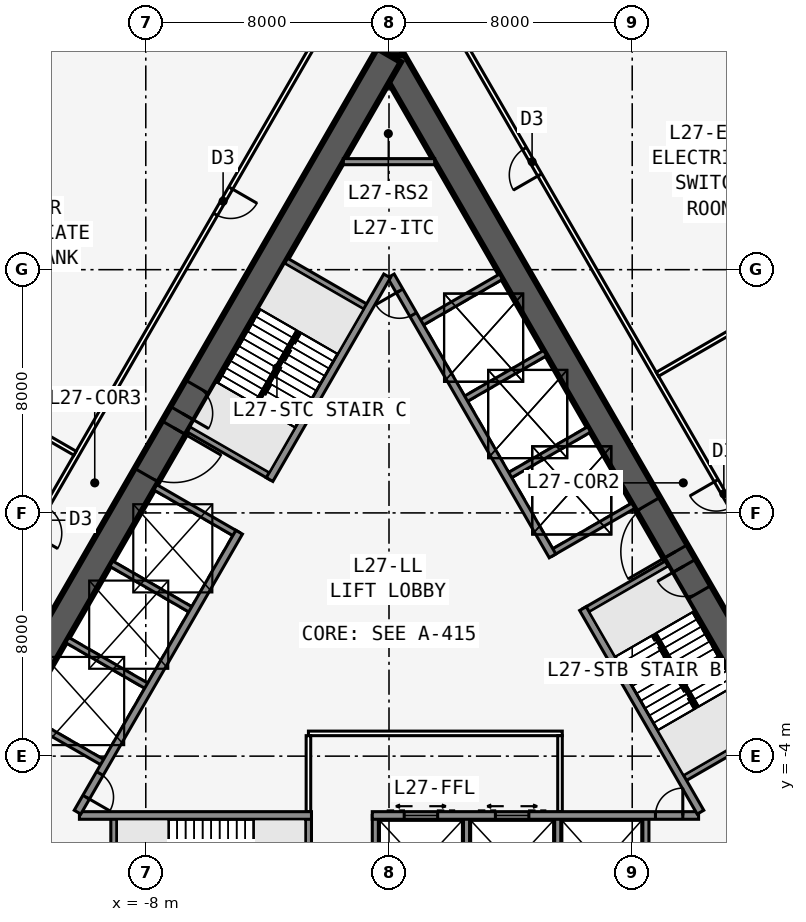
"""IFC4 building model, lengths in metres.
Left out: names, types, materials, properties, quantities, classifications, styles, units other than length and angle.
Written with IfcOpenShell. Run it as: python <this file> out.ifc"""

import sys

from ifc_helpers import new_model, si_unit, direction, frame, frame_2d, origin, place, context, subcontext, project, spatial, rectangle, extrude, element, fill, save


model = new_model("IFC4")
c1 = context("Model", 3, precision=1e-05, world=origin(), true_north=direction((0.0, 1.0)))
c2 = subcontext(c1, "Body", "Model", "MODEL_VIEW")
j1 = project(units=[si_unit("LENGTHUNIT", "METRE"), si_unit("PLANEANGLEUNIT", "RADIAN")], contexts=[c1])
p1 = place(None, origin())
s1 = spatial("IfcSite", under=j1, at=p1, CompositionType="ELEMENT")
p2 = place(p1, origin())
s2 = spatial("IfcBuilding", under=s1, at=p2, CompositionType="ELEMENT")
p3 = place(p2, frame((0.0, 0.0, 103.3)))
s3 = spatial("IfcBuildingStorey", under=s2, at=p3, CompositionType="ELEMENT", Elevation=103.3)
p4 = place(p3, frame((-10.183, -5.951, 0.0), z_axis=(0.0, 0.0, 1.0), x_axis=(1.0, 0.0, 0.0)))
e1 = element("IfcWall", 1, at=p4, inside=s3, PredefinedType="SOLIDWALL", context=c2, shape_type="SweptSolid", body=[
    extrude(rectangle(XDim=7.633, YDim=0.25, at=frame_2d((3.816, 0.0))), origin(), (0.0, 0.0, 1.0), 6.15),
])
p5 = place(p3, frame((-0.55, -5.951, 0.0), z_axis=(0.0, 0.0, 1.0), x_axis=(1.0, 0.0, 0.0)))
e2 = element("IfcWall", 2, at=p5, inside=s3, PredefinedType="SOLIDWALL", context=c2, shape_type="SweptSolid", body=[
    extrude(rectangle(XDim=10.733, YDim=0.25, at=frame_2d((5.366, 0.0))), origin(), (0.0, 0.0, 1.0), 6.15),
])
p6 = place(p5, frame((9.314, 0.0, 0.0)))
e3 = element("IfcOpeningElement", 3, at=p6, cuts=e2, PredefinedType="OPENING", context=c2, shape_type="SweptSolid", body=[
    extrude(rectangle(XDim=0.9, YDim=2.13, at=frame_2d((0.45, 1.065))), frame((0.0, 0.135, 0.0), z_axis=(0.0, -1.0, 0.0), x_axis=(1.0, 0.0, 0.0)), (0.0, 0.0, 1.0), 0.27),
])
p7 = place(p5, frame((1.05, 0.0, 0.0)))
e4 = element("IfcOpeningElement", 4, at=p7, cuts=e2, PredefinedType="OPENING", context=c2, shape_type="SweptSolid", body=[
    extrude(rectangle(XDim=1.1, YDim=2.13, at=frame_2d((0.55, 1.065))), frame((0.0, 0.135, 0.0), z_axis=(0.0, -1.0, 0.0), x_axis=(1.0, 0.0, 0.0)), (0.0, 0.0, 1.0), 0.27),
])
p8 = place(p5, frame((4.05, 0.0, 0.0)))
e5 = element("IfcOpeningElement", 5, at=p8, cuts=e2, PredefinedType="OPENING", context=c2, shape_type="SweptSolid", body=[
    extrude(rectangle(XDim=1.1, YDim=2.13, at=frame_2d((0.55, 1.065))), frame((0.0, 0.135, 0.0), z_axis=(0.0, -1.0, 0.0), x_axis=(1.0, 0.0, 0.0)), (0.0, 0.0, 1.0), 0.27),
])
p9 = place(p3, frame((-9.05, -5.951, 0.0), z_axis=(0.0, 0.0, 1.0), x_axis=(0.0, -1.0, 0.0)))
e6 = element("IfcWall", 6, at=p9, inside=s3, PredefinedType="SOLIDWALL", context=c2, shape_type="SweptSolid", body=[
    extrude(rectangle(XDim=3.125, YDim=0.2, at=frame_2d((1.562, 0.0))), origin(), (0.0, 0.0, 1.0), 6.15),
])
p10 = place(p3, frame((-2.65, -5.951, 0.0), z_axis=(0.0, 0.0, 1.0), x_axis=(0.0, -1.0, 0.0)))
e7 = element("IfcWall", 7, at=p10, inside=s3, PredefinedType="SOLIDWALL", context=c2, shape_type="SweptSolid", body=[
    extrude(rectangle(XDim=3.125, YDim=0.2, at=frame_2d((1.562, 0.0))), origin(), (0.0, 0.0, 1.0), 6.15),
])
p11 = place(p10, frame((1.525, 0.0, 0.0)))
e8 = element("IfcOpeningElement", 8, at=p11, cuts=e7, PredefinedType="OPENING", context=c2, shape_type="SweptSolid", body=[
    extrude(rectangle(XDim=1.0, YDim=2.13, at=frame_2d((0.5, 1.065))), frame((0.0, 0.11, 0.0), z_axis=(0.0, -1.0, 0.0), x_axis=(1.0, 0.0, 0.0)), (0.0, 0.0, 1.0), 0.22),
])
for number, where, z_axis, x_axis in (
    (9, (-0.45, -5.951, 0.0), (0.0, 0.0, 1.0), (0.0, -1.0, 0.0)),
    (10, (2.55, -5.951, 0.0), (0.0, 0.0, 1.0), (0.0, -1.0, 0.0)),
    (11, (5.55, -5.951, 0.0), (0.0, 0.0, 1.0), (0.0, -1.0, 0.0)),
    (12, (8.45, -5.951, 0.0), (0.0, 0.0, 1.0), (0.0, -1.0, 0.0)),
):
    element("IfcWall", number, at=place(p3, frame(where, z_axis=z_axis, x_axis=x_axis)), inside=s3, PredefinedType="SOLIDWALL", context=c2, shape_type="SweptSolid", body=[
        extrude(rectangle(XDim=3.125, YDim=0.2, at=frame_2d((1.562, 0.0))), origin(), (0.0, 0.0, 1.0), 6.15),
    ])
p12 = place(p3, frame((16.5, -9.526, 0.0), z_axis=(0.0, 0.0, 1.0), x_axis=(-0.499999749417, 0.866025548458, 0.0)))
e13 = element("IfcWall", 13, at=p12, inside=s3, PredefinedType="SHEAR", context=c2, shape_type="SweptSolid", body=[
    extrude(rectangle(XDim=33.0, YDim=0.9, at=frame_2d((16.5, 0.0))), origin(), (0.0, 0.0, 1.0), 6.4),
])
p13 = place(p12, frame((14.15, 0.0, 0.0)))
e14 = element("IfcOpeningElement", 14, at=p13, cuts=e13, PredefinedType="OPENING", context=c2, shape_type="SweptSolid", body=[
    extrude(rectangle(XDim=1.8, YDim=2.13, at=frame_2d((0.9, 1.065))), frame((0.0, 0.46, 0.0), z_axis=(0.0, -1.0, 0.0), x_axis=(1.0, 0.0, 0.0)), (0.0, 0.0, 1.0), 0.92),
])
p14 = place(p12, frame((12.6, 0.0, 0.0)))
e15 = element("IfcOpeningElement", 15, at=p14, cuts=e13, PredefinedType="OPENING", context=c2, shape_type="SweptSolid", body=[
    extrude(rectangle(XDim=1.0, YDim=2.13, at=frame_2d((0.5, 1.065))), frame((0.0, 0.46, 0.0), z_axis=(0.0, -1.0, 0.0), x_axis=(1.0, 0.0, 0.0)), (0.0, 0.0, 1.0), 0.92),
])
p15 = place(p3, frame((10.245, -5.843, 0.0), z_axis=(0.0, 0.0, 1.0), x_axis=(-0.499993009313, 0.866029439822, 0.0)))
e16 = element("IfcWall", 16, at=p15, inside=s3, PredefinedType="SOLIDWALL", context=c2, shape_type="SweptSolid", body=[
    extrude(rectangle(XDim=7.733, YDim=0.25, at=frame_2d((3.866, 0.0))), origin(), (0.0, 0.0, 1.0), 6.15),
])
p16 = place(p3, frame((5.379, 2.586, 0.0), z_axis=(0.0, 0.0, 1.0), x_axis=(-0.500001375892, 0.866024609411, 0.0)))
e17 = element("IfcWall", 17, at=p16, inside=s3, PredefinedType="SOLIDWALL", context=c2, shape_type="SweptSolid", body=[
    extrude(rectangle(XDim=10.633, YDim=0.25, at=frame_2d((5.316, 0.0))), origin(), (0.0, 0.0, 1.0), 6.15),
])
p17 = place(p16, frame((9.164, 0.0, 0.0)))
e18 = element("IfcOpeningElement", 18, at=p17, cuts=e17, PredefinedType="OPENING", context=c2, shape_type="SweptSolid", body=[
    extrude(rectangle(XDim=0.9, YDim=2.13, at=frame_2d((0.45, 1.065))), frame((0.0, 0.135, 0.0), z_axis=(0.0, -1.0, 0.0), x_axis=(1.0, 0.0, 0.0)), (0.0, 0.0, 1.0), 0.27),
])
for number, where, z_axis, x_axis in (
    (19, (9.629, -4.775, 0.0), (0.0, 0.0, 1.0), (0.866, 0.5, 0.0)),
    (20, (6.429, 0.767, 0.0), (0.0, 0.0, 1.0), (0.866, 0.5, 0.0)),
    (21, (5.329, 2.673, 0.0), (0.0, 0.0, 1.0), (0.866, 0.5, 0.0)),
    (22, (3.879, 5.184, 0.0), (0.0, 0.0, 1.0), (0.866, 0.5, 0.0)),
    (23, (2.429, 7.696, 0.0), (0.0, 0.0, 1.0), (0.866, 0.5, 0.0)),
    (24, (0.979, 10.207, 0.0), (0.0, 0.0, 1.0), (0.866, 0.5, 0.0)),
):
    element("IfcWall", number, at=place(p3, frame(where, z_axis=z_axis, x_axis=x_axis)), inside=s3, PredefinedType="SOLIDWALL", context=c2, shape_type="SweptSolid", body=[
        extrude(rectangle(XDim=3.125, YDim=0.2, at=frame_2d((1.562, 0.0))), origin(), (0.0, 0.0, 1.0), 6.15),
    ])
p18 = place(p3, frame((0.0, 19.052, 0.0), z_axis=(0.0, 0.0, 1.0), x_axis=(-0.499999749417, -0.866025548458, 0.0)))
e25 = element("IfcWall", 25, at=p18, inside=s3, PredefinedType="SHEAR", context=c2, shape_type="SweptSolid", body=[
    extrude(rectangle(XDim=33.0, YDim=0.9, at=frame_2d((16.5, 0.0))), origin(), (0.0, 0.0, 1.0), 6.4),
])
p19 = place(p18, frame((14.15, 0.0, 0.0)))
e26 = element("IfcOpeningElement", 26, at=p19, cuts=e25, PredefinedType="OPENING", context=c2, shape_type="SweptSolid", body=[
    extrude(rectangle(XDim=1.8, YDim=2.13, at=frame_2d((0.9, 1.065))), frame((0.0, 0.46, 0.0), z_axis=(0.0, -1.0, 0.0), x_axis=(1.0, 0.0, 0.0)), (0.0, 0.0, 1.0), 0.92),
])
p20 = place(p18, frame((12.6, 0.0, 0.0)))
e27 = element("IfcOpeningElement", 27, at=p20, cuts=e25, PredefinedType="OPENING", context=c2, shape_type="SweptSolid", body=[
    extrude(rectangle(XDim=1.0, YDim=2.13, at=frame_2d((0.5, 1.065))), frame((0.0, 0.46, 0.0), z_axis=(0.0, -1.0, 0.0), x_axis=(1.0, 0.0, 0.0)), (0.0, 0.0, 1.0), 0.92),
])
p21 = place(p3, frame((-0.062, 11.794, 0.0), z_axis=(0.0, 0.0, 1.0), x_axis=(-0.500006680225, -0.86602154692, 0.0)))
e28 = element("IfcWall", 28, at=p21, inside=s3, PredefinedType="SOLIDWALL", context=c2, shape_type="SweptSolid", body=[
    extrude(rectangle(XDim=7.733, YDim=0.25, at=frame_2d((3.866, 0.0))), origin(), (0.0, 0.0, 1.0), 6.15),
])
p22 = place(p3, frame((-4.929, 3.365, 0.0), z_axis=(0.0, 0.0, 1.0), x_axis=(-0.499991433582, -0.866030349552, 0.0)))
e29 = element("IfcWall", 29, at=p22, inside=s3, PredefinedType="SOLIDWALL", context=c2, shape_type="SweptSolid", body=[
    extrude(rectangle(XDim=10.633, YDim=0.25, at=frame_2d((5.316, 0.0))), origin(), (0.0, 0.0, 1.0), 6.15),
])
p23 = place(p22, frame((9.164, 0.0, 0.0)))
e30 = element("IfcOpeningElement", 30, at=p23, cuts=e29, PredefinedType="OPENING", context=c2, shape_type="SweptSolid", body=[
    extrude(rectangle(XDim=0.9, YDim=2.13, at=frame_2d((0.45, 1.065))), frame((0.0, 0.135, 0.0), z_axis=(0.0, -1.0, 0.0), x_axis=(1.0, 0.0, 0.0)), (0.0, 0.0, 1.0), 0.27),
])
for number, where, z_axis, x_axis in (
    (31, (-0.679, 10.727, 0.0), (0.0, 0.0, 1.0), (-0.866, 0.5, 0.0)),
    (32, (-3.879, 5.184, 0.0), (0.0, 0.0, 1.0), (-0.866, 0.5, 0.0)),
    (33, (-4.979, 3.279, 0.0), (0.0, 0.0, 1.0), (-0.866, 0.5, 0.0)),
    (34, (-6.429, 0.767, 0.0), (0.0, 0.0, 1.0), (-0.866, 0.5, 0.0)),
    (35, (-7.879, -1.744, 0.0), (0.0, 0.0, 1.0), (-0.866, 0.5, 0.0)),
    (36, (-9.329, -4.256, 0.0), (0.0, 0.0, 1.0), (-0.866, 0.5, 0.0)),
):
    element("IfcWall", number, at=place(p3, frame(where, z_axis=z_axis, x_axis=x_axis)), inside=s3, PredefinedType="SOLIDWALL", context=c2, shape_type="SweptSolid", body=[
        extrude(rectangle(XDim=3.125, YDim=0.2, at=frame_2d((1.562, 0.0))), origin(), (0.0, 0.0, 1.0), 6.15),
    ])
p24 = place(p3, frame((0.0, 19.052, 0.0), z_axis=(0.0, 0.0, 1.0), x_axis=(0.0, 1.0, 0.0)))
e37 = element("IfcWall", 37, at=p24, inside=s3, PredefinedType="SHEAR", context=c2, shape_type="SweptSolid", body=[
    extrude(rectangle(XDim=4.746, YDim=0.9, at=frame_2d((2.373, 0.0))), origin(), (0.0, 0.0, 1.0), 6.4),
])
p25 = place(p24, frame((1.8, 0.0, 0.0)))
e38 = element("IfcOpeningElement", 38, at=p25, cuts=e37, PredefinedType="OPENING", context=c2, shape_type="SweptSolid", body=[
    extrude(rectangle(XDim=1.8, YDim=2.13, at=frame_2d((0.9, 1.065))), frame((0.0, 0.46, 0.0), z_axis=(0.0, -1.0, 0.0), x_axis=(1.0, 0.0, 0.0)), (0.0, 0.0, 1.0), 0.92),
])
p26 = place(p3, frame((20.027, -10.985, 0.0), z_axis=(0.0, 0.0, 1.0), x_axis=(-0.500001677587, 0.866024435227, 0.0)))
e39 = element("IfcWall", 39, at=p26, inside=s3, PredefinedType="PARTITIONING", context=c2, shape_type="SweptSolid", body=[
    extrude(rectangle(XDim=39.054, YDim=0.15, at=frame_2d((19.527, 0.0))), origin(), (0.0, 0.0, 1.0), 6.15),
])
p27 = place(p26, frame((6.414, 0.0, 0.0)))
e40 = element("IfcOpeningElement", 40, at=p27, cuts=e39, PredefinedType="OPENING", context=c2, shape_type="SweptSolid", body=[
    extrude(rectangle(XDim=1.0, YDim=2.13, at=frame_2d((0.5, 1.065))), frame((0.0, 0.085, 0.0), z_axis=(0.0, -1.0, 0.0), x_axis=(1.0, 0.0, 0.0)), (0.0, 0.0, 1.0), 0.17),
])
p28 = place(p26, frame((17.527, 0.0, 0.0)))
e41 = element("IfcOpeningElement", 41, at=p28, cuts=e39, PredefinedType="OPENING", context=c2, shape_type="SweptSolid", body=[
    extrude(rectangle(XDim=1.0, YDim=2.13, at=frame_2d((0.5, 1.065))), frame((0.0, 0.085, 0.0), z_axis=(0.0, -1.0, 0.0), x_axis=(1.0, 0.0, 0.0)), (0.0, 0.0, 1.0), 0.17),
])
p29 = place(p26, frame((30.14, 0.0, 0.0)))
e42 = element("IfcOpeningElement", 42, at=p29, cuts=e39, PredefinedType="OPENING", context=c2, shape_type="SweptSolid", body=[
    extrude(rectangle(XDim=1.0, YDim=2.13, at=frame_2d((0.5, 1.065))), frame((0.0, 0.085, 0.0), z_axis=(0.0, -1.0, 0.0), x_axis=(1.0, 0.0, 0.0)), (0.0, 0.0, 1.0), 0.17),
])
p30 = place(p3, frame((8.829, 8.561, 0.0), z_axis=(0.0, 0.0, 1.0), x_axis=(0.86602100491, 0.500007618997, 0.0)))
e43 = element("IfcWall", 43, at=p30, inside=s3, PredefinedType="PARTITIONING", context=c2, shape_type="SweptSolid", body=[
    extrude(rectangle(XDim=10.005, YDim=0.15, at=frame_2d((5.002, 0.0))), origin(), (0.0, 0.0, 1.0), 6.15),
])
p31 = place(p3, frame((-0.5, 22.836, 0.0), z_axis=(0.0, 0.0, 1.0), x_axis=(-0.500001677587, -0.866024435227, 0.0)))
e44 = element("IfcWall", 44, at=p31, inside=s3, PredefinedType="PARTITIONING", context=c2, shape_type="SweptSolid", body=[
    extrude(rectangle(XDim=39.054, YDim=0.15, at=frame_2d((19.527, 0.0))), origin(), (0.0, 0.0, 1.0), 6.15),
])
p32 = place(p31, frame((9.414, 0.0, 0.0)))
e45 = element("IfcOpeningElement", 45, at=p32, cuts=e44, PredefinedType="OPENING", context=c2, shape_type="SweptSolid", body=[
    extrude(rectangle(XDim=1.0, YDim=2.13, at=frame_2d((0.5, 1.065))), frame((0.0, 0.085, 0.0), z_axis=(0.0, -1.0, 0.0), x_axis=(1.0, 0.0, 0.0)), (0.0, 0.0, 1.0), 0.17),
])
p33 = place(p31, frame((21.527, 0.0, 0.0)))
e46 = element("IfcOpeningElement", 46, at=p33, cuts=e44, PredefinedType="OPENING", context=c2, shape_type="SweptSolid", body=[
    extrude(rectangle(XDim=1.0, YDim=2.13, at=frame_2d((0.5, 1.065))), frame((0.0, 0.085, 0.0), z_axis=(0.0, -1.0, 0.0), x_axis=(1.0, 0.0, 0.0)), (0.0, 0.0, 1.0), 0.17),
])
p34 = place(p31, frame((31.14, 0.0, 0.0)))
e47 = element("IfcOpeningElement", 47, at=p34, cuts=e44, PredefinedType="OPENING", context=c2, shape_type="SweptSolid", body=[
    extrude(rectangle(XDim=1.0, YDim=2.13, at=frame_2d((0.5, 1.065))), frame((0.0, 0.085, 0.0), z_axis=(0.0, -1.0, 0.0), x_axis=(1.0, 0.0, 0.0)), (0.0, 0.0, 1.0), 0.17),
])
p35 = place(p3, frame((-10.329, 5.963, 0.0), z_axis=(0.0, 0.0, 1.0), x_axis=(-0.866021688545, 0.500006434927, 0.0)))
e48 = element("IfcWall", 48, at=p35, inside=s3, PredefinedType="PARTITIONING", context=c2, shape_type="SweptSolid", body=[
    extrude(rectangle(XDim=10.096, YDim=0.15, at=frame_2d((5.048, 0.0))), origin(), (0.0, 0.0, 1.0), 5.109),
])
p36 = place(p3, frame((-2.65, -3.251, 0.0), z_axis=(0.0, 0.0, 1.0), x_axis=(1.0, 0.0, 0.0)))
e49 = element("IfcWall", 49, at=p36, inside=s3, PredefinedType="PARTITIONING", context=c2, shape_type="SweptSolid", body=[
    extrude(rectangle(XDim=8.35, YDim=0.15, at=frame_2d((4.175, 0.0))), origin(), (0.0, 0.0, 1.0), 6.15),
])
for number, where, z_axis, x_axis in (
    (50, (-2.65, -5.826, 0.0), (0.0, 0.0, 1.0), (0.0, 1.0, 0.0)),
    (51, (5.625, -5.826, 0.0), (0.0, 0.0, 1.0), (0.0, 1.0, 0.0)),
):
    element("IfcWall", number, at=place(p3, frame(where, z_axis=z_axis, x_axis=x_axis)), inside=s3, PredefinedType="PARTITIONING", context=c2, shape_type="SweptSolid", body=[
        extrude(rectangle(XDim=2.5, YDim=0.15, at=frame_2d((1.25, 0.0))), origin(), (0.0, 0.0, 1.0), 6.15),
    ])
p37 = place(p3, frame((-1.501, 15.552, 0.0), z_axis=(0.0, 0.0, 1.0), x_axis=(1.0, 0.0, 0.0)))
e52 = element("IfcWall", 52, at=p37, inside=s3, PredefinedType="SOLIDWALL", context=c2, shape_type="SweptSolid", body=[
    extrude(rectangle(XDim=3.002, YDim=0.2, at=frame_2d((1.501, 0.0))), origin(), (0.0, 0.0, 1.0), 6.15),
])
for number, where, z_axis, x_axis in (
    (53, (10.135, -2.401, 0.0), (0.0, 0.0, 1.0), (-0.5, 0.866, 0.0)),
    (54, (-2.988, 9.978, 0.0), (0.0, 0.0, 1.0), (-0.5, -0.866, 0.0)),
):
    element("IfcWall", number, at=place(p3, frame(where, z_axis=z_axis, x_axis=x_axis)), inside=s3, PredefinedType="SOLIDWALL", context=c2, shape_type="SweptSolid", body=[
        extrude(rectangle(XDim=2.794, YDim=0.1, at=frame_2d((1.397, 0.0))), origin(), (0.0, 0.0, 1.0), 6.4),
    ])
p38 = place(p28, origin())
e55 = element("IfcDoor", 55, at=p38, inside=s3, OperationType="SINGLE_SWING_RIGHT", PredefinedType="DOOR", context=c2, shape_type="SweptSolid", body=[
    extrude(rectangle(XDim=1.0, YDim=2.13, at=frame_2d((0.5, 1.065))), frame((0.0, 0.025, 0.0), z_axis=(0.0, -1.0, 0.0), x_axis=(1.0, 0.0, 0.0)), (0.0, 0.0, 1.0), 0.05),
])
fill(e41, e55)
p39 = place(p29, origin())
e56 = element("IfcDoor", 56, at=p39, inside=s3, OperationType="SINGLE_SWING_LEFT", PredefinedType="DOOR", context=c2, shape_type="SweptSolid", body=[
    extrude(rectangle(XDim=1.0, YDim=2.13, at=frame_2d((0.5, 1.065))), frame((0.0, 0.025, 0.0), z_axis=(0.0, -1.0, 0.0), x_axis=(1.0, 0.0, 0.0)), (0.0, 0.0, 1.0), 0.05),
])
fill(e42, e56)
p40 = place(p32, origin())
e57 = element("IfcDoor", 57, at=p40, inside=s3, OperationType="SINGLE_SWING_LEFT", PredefinedType="DOOR", context=c2, shape_type="SweptSolid", body=[
    extrude(rectangle(XDim=1.0, YDim=2.13, at=frame_2d((0.5, 1.065))), frame((0.0, 0.025, 0.0), z_axis=(0.0, -1.0, 0.0), x_axis=(1.0, 0.0, 0.0)), (0.0, 0.0, 1.0), 0.05),
])
fill(e45, e57)
p41 = place(p13, origin())
e58 = element("IfcDoor", 58, at=p41, inside=s3, OperationType="DOUBLE_DOOR_SINGLE_SWING", PredefinedType="DOOR", context=c2, shape_type="SweptSolid", body=[
    extrude(rectangle(XDim=1.8, YDim=2.13, at=frame_2d((0.9, 1.065))), frame((0.0, 0.025, 0.0), z_axis=(0.0, -1.0, 0.0), x_axis=(1.0, 0.0, 0.0)), (0.0, 0.0, 1.0), 0.05),
])
fill(e14, e58)
p42 = place(p14, origin())
e59 = element("IfcDoor", 59, at=p42, inside=s3, OperationType="SINGLE_SWING_RIGHT", PredefinedType="DOOR", context=c2, shape_type="SweptSolid", body=[
    extrude(rectangle(XDim=1.0, YDim=2.13, at=frame_2d((0.5, 1.065))), frame((0.0, 0.025, 0.0), z_axis=(0.0, -1.0, 0.0), x_axis=(1.0, 0.0, 0.0)), (0.0, 0.0, 1.0), 0.05),
])
fill(e15, e59)
p43 = place(p19, origin())
e60 = element("IfcDoor", 60, at=p43, inside=s3, OperationType="DOUBLE_DOOR_SINGLE_SWING", PredefinedType="DOOR", context=c2, shape_type="SweptSolid", body=[
    extrude(rectangle(XDim=1.8, YDim=2.13, at=frame_2d((0.9, 1.065))), frame((0.0, 0.025, 0.0), z_axis=(0.0, -1.0, 0.0), x_axis=(1.0, 0.0, 0.0)), (0.0, 0.0, 1.0), 0.05),
])
fill(e26, e60)
p44 = place(p20, origin())
e61 = element("IfcDoor", 61, at=p44, inside=s3, OperationType="SINGLE_SWING_RIGHT", PredefinedType="DOOR", context=c2, shape_type="SweptSolid", body=[
    extrude(rectangle(XDim=1.0, YDim=2.13, at=frame_2d((0.5, 1.065))), frame((0.0, 0.025, 0.0), z_axis=(0.0, -1.0, 0.0), x_axis=(1.0, 0.0, 0.0)), (0.0, 0.0, 1.0), 0.05),
])
fill(e27, e61)
p45 = place(p6, origin())
e62 = element("IfcDoor", 62, at=p45, inside=s3, OperationType="SINGLE_SWING_RIGHT", PredefinedType="DOOR", context=c2, shape_type="SweptSolid", body=[
    extrude(rectangle(XDim=0.9, YDim=2.13, at=frame_2d((0.45, 1.065))), frame((0.0, 0.025, 0.0), z_axis=(0.0, -1.0, 0.0), x_axis=(1.0, 0.0, 0.0)), (0.0, 0.0, 1.0), 0.05),
])
fill(e3, e62)
p46 = place(p17, origin())
e63 = element("IfcDoor", 63, at=p46, inside=s3, OperationType="SINGLE_SWING_RIGHT", PredefinedType="DOOR", context=c2, shape_type="SweptSolid", body=[
    extrude(rectangle(XDim=0.9, YDim=2.13, at=frame_2d((0.45, 1.065))), frame((0.0, 0.025, 0.0), z_axis=(0.0, -1.0, 0.0), x_axis=(1.0, 0.0, 0.0)), (0.0, 0.0, 1.0), 0.05),
])
fill(e18, e63)
p47 = place(p23, origin())
e64 = element("IfcDoor", 64, at=p47, inside=s3, OperationType="SINGLE_SWING_RIGHT", PredefinedType="DOOR", context=c2, shape_type="SweptSolid", body=[
    extrude(rectangle(XDim=0.9, YDim=2.13, at=frame_2d((0.45, 1.065))), frame((0.0, 0.025, 0.0), z_axis=(0.0, -1.0, 0.0), x_axis=(1.0, 0.0, 0.0)), (0.0, 0.0, 1.0), 0.05),
])
fill(e30, e64)
p48 = place(p7, origin())
e65 = element("IfcDoor", 65, at=p48, inside=s3, OperationType="DOUBLE_DOOR_SLIDING", PredefinedType="USERDEFINED", context=c2, shape_type="SweptSolid", body=[
    extrude(rectangle(XDim=1.1, YDim=2.13, at=frame_2d((0.55, 1.065))), frame((0.0, 0.025, 0.0), z_axis=(0.0, -1.0, 0.0), x_axis=(1.0, 0.0, 0.0)), (0.0, 0.0, 1.0), 0.05),
])
fill(e4, e65)
p49 = place(p8, origin())
e66 = element("IfcDoor", 66, at=p49, inside=s3, OperationType="DOUBLE_DOOR_SLIDING", PredefinedType="USERDEFINED", context=c2, shape_type="SweptSolid", body=[
    extrude(rectangle(XDim=1.1, YDim=2.13, at=frame_2d((0.55, 1.065))), frame((0.0, 0.025, 0.0), z_axis=(0.0, -1.0, 0.0), x_axis=(1.0, 0.0, 0.0)), (0.0, 0.0, 1.0), 0.05),
])
fill(e5, e66)
save(model, sys.argv[1])
